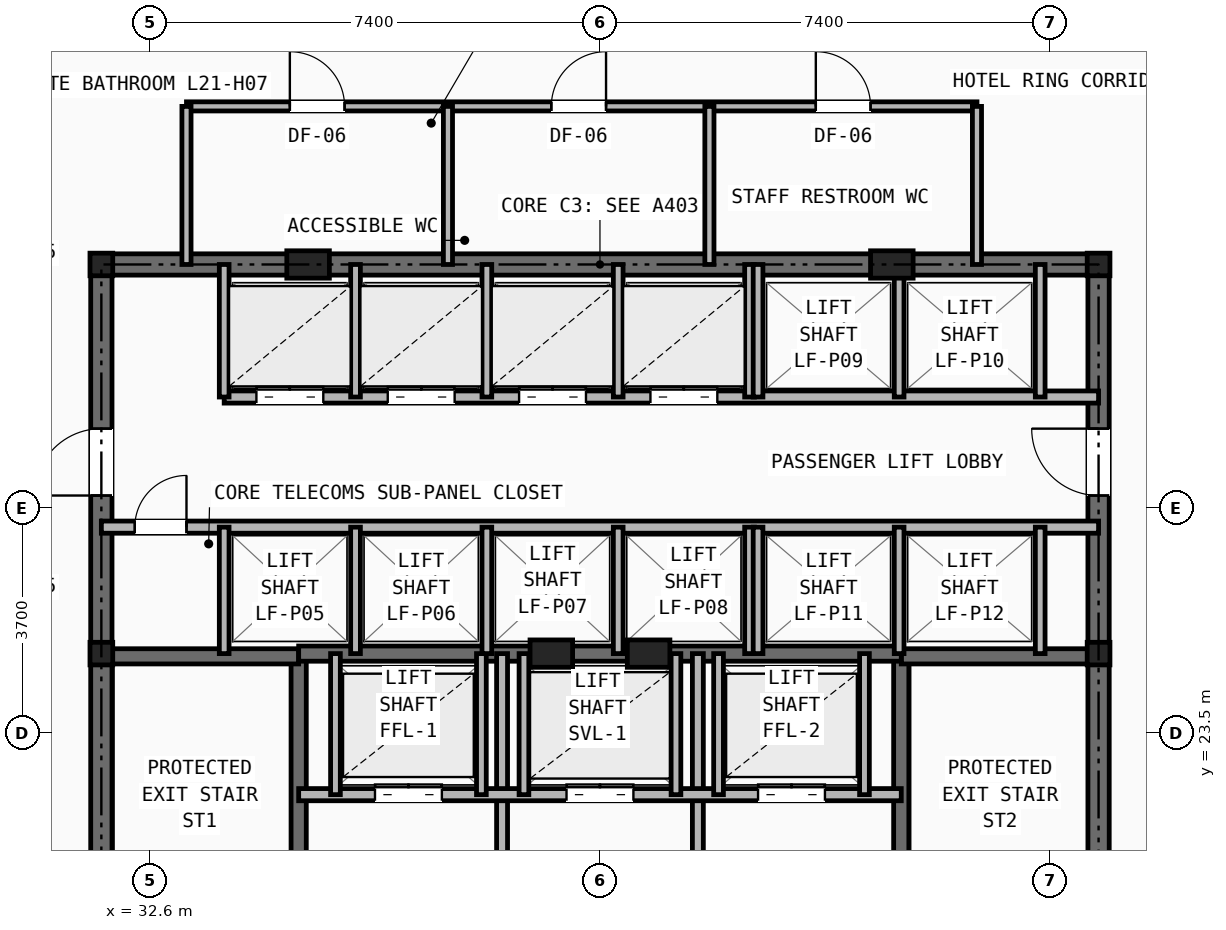
"""IFC4 building model, lengths in metres.
Left out: names, types, materials, properties, quantities, classifications, styles, units other than length and angle.
Written with IfcOpenShell. Run it as: python <this file> out.ifc"""

import sys

from ifc_helpers import new_model, si_unit, direction, frame, frame_2d, origin, origin_2d, place, context, subcontext, project, spatial, rectangle, i_section, extrude, element, fill, save


model = new_model("IFC4")
c1 = context("Model", 3, precision=1e-05, world=origin(), true_north=direction((0.0, 1.0)))
c2 = subcontext(c1, "Body", "Model", "MODEL_VIEW")
j1 = project(units=[si_unit("LENGTHUNIT", "METRE"), si_unit("PLANEANGLEUNIT", "RADIAN")], contexts=[c1])
p1 = place(None, origin())
s1 = spatial("IfcSite", under=j1, at=p1, CompositionType="ELEMENT")
p2 = place(p1, origin())
s2 = spatial("IfcBuilding", under=s1, at=p2, CompositionType="ELEMENT")
p3 = place(p2, frame((0.0, 0.0, 76.6)))
s3 = spatial("IfcBuildingStorey", under=s2, at=p3, CompositionType="ELEMENT", Elevation=76.6)
for number, where, z_axis, x_axis in (
    (1, (31.8, 24.8, 0.0), (0.0, 0.0, 1.0), (1.0, 0.0, 0.0)),
    (2, (48.2, 24.8, 0.0), (0.0, 0.0, 1.0), (1.0, 0.0, 0.0)),
    (3, (31.8, 31.2, 0.0), (0.0, 0.0, 1.0), (1.0, 0.0, 0.0)),
    (4, (48.2, 31.2, 0.0), (0.0, 0.0, 1.0), (1.0, 0.0, 0.0)),
):
    element("IfcColumn", number, at=place(p3, frame(where, z_axis=z_axis, x_axis=x_axis)), inside=s3, PredefinedType="COLUMN", context=c2, shape_type="SweptSolid", body=[
        extrude(i_section(OverallWidth=0.374, OverallDepth=0.372, WebThickness=0.016, FlangeThickness=0.026, at=origin_2d()), origin(), (0.0, 0.0, 1.0), 3.2),
    ])
for number, where, z_axis, x_axis in (
    (5, (35.2, 31.2, 0.0), (0.0, 0.0, 1.0), (1.0, 0.0, 0.0)),
    (6, (44.8, 31.2, 0.0), (0.0, 0.0, 1.0), (1.0, 0.0, 0.0)),
    (7, (39.2, 24.8, 0.0), (0.0, 0.0, 1.0), (1.0, 0.0, 0.0)),
    (8, (40.8, 24.8, 0.0), (0.0, 0.0, 1.0), (1.0, 0.0, 0.0)),
):
    element("IfcColumn", number, at=place(p3, frame(where, z_axis=z_axis, x_axis=x_axis)), inside=s3, PredefinedType="PILASTER", context=c2, shape_type="SweptSolid", body=[
        extrude(rectangle(XDim=0.7, YDim=0.45, at=origin_2d()), origin(), (0.0, 0.0, 1.0), 3.2),
    ])
p4 = place(p3, frame((31.8, 31.2, 0.0), z_axis=(0.0, 0.0, 1.0), x_axis=(1.0, 0.0, 0.0)))
e9 = element("IfcWall", 9, at=p4, inside=s3, PredefinedType="SHEAR", context=c2, shape_type="SweptSolid", body=[
    extrude(rectangle(XDim=16.4, YDim=0.35, at=frame_2d((8.2, 0.0))), origin(), (0.0, 0.0, 1.0), 2.97),
])
p5 = place(p3, frame((31.8, 16.4, 0.0), z_axis=(0.0, 0.0, 1.0), x_axis=(0.0, 1.0, 0.0)))
e10 = element("IfcWall", 10, at=p5, inside=s3, PredefinedType="SHEAR", context=c2, shape_type="SweptSolid", body=[
    extrude(rectangle(XDim=14.8, YDim=0.35, at=frame_2d((7.4, 0.0))), origin(), (0.0, 0.0, 1.0), 2.97),
])
p6 = place(p5, frame((11.0, 0.0, 0.0)))
e11 = element("IfcOpeningElement", 11, at=p6, cuts=e10, PredefinedType="OPENING", context=c2, shape_type="SweptSolid", body=[
    extrude(rectangle(XDim=1.1, YDim=2.15, at=frame_2d((0.55, 1.075))), frame((0.0, 0.185, 0.0), z_axis=(0.0, -1.0, 0.0), x_axis=(1.0, 0.0, 0.0)), (0.0, 0.0, 1.0), 0.37),
])
p7 = place(p3, frame((48.2, 16.4, 0.0), z_axis=(0.0, 0.0, 1.0), x_axis=(0.0, 1.0, 0.0)))
e12 = element("IfcWall", 12, at=p7, inside=s3, PredefinedType="SHEAR", context=c2, shape_type="SweptSolid", body=[
    extrude(rectangle(XDim=14.8, YDim=0.35, at=frame_2d((7.4, 0.0))), origin(), (0.0, 0.0, 1.0), 2.97),
])
p8 = place(p7, frame((11.0, 0.0, 0.0)))
e13 = element("IfcOpeningElement", 13, at=p8, cuts=e12, PredefinedType="OPENING", context=c2, shape_type="SweptSolid", body=[
    extrude(rectangle(XDim=1.1, YDim=2.15, at=frame_2d((0.55, 1.075))), frame((0.0, 0.185, 0.0), z_axis=(0.0, -1.0, 0.0), x_axis=(1.0, 0.0, 0.0)), (0.0, 0.0, 1.0), 0.37),
])
p9 = place(p3, frame((35.045, 16.4, 0.0), z_axis=(0.0, 0.0, 1.0), x_axis=(0.0, 1.0, 0.0)))
e14 = element("IfcWall", 14, at=p9, inside=s3, PredefinedType="SHEAR", context=c2, shape_type="SweptSolid", body=[
    extrude(rectangle(XDim=8.4, YDim=0.25, at=frame_2d((4.2, 0.0))), origin(), (0.0, 0.0, 1.0), 2.97),
])
p10 = place(p9, frame((0.45, 0.0, 0.0)))
e15 = element("IfcOpeningElement", 15, at=p10, cuts=e14, PredefinedType="OPENING", context=c2, shape_type="SweptSolid", body=[
    extrude(rectangle(XDim=0.95, YDim=2.1, at=frame_2d((0.475, 1.05))), frame((0.0, 0.135, 0.0), z_axis=(0.0, -1.0, 0.0), x_axis=(1.0, 0.0, 0.0)), (0.0, 0.0, 1.0), 0.27),
])
p11 = place(p3, frame((31.8, 24.755, 0.0), z_axis=(0.0, 0.0, 1.0), x_axis=(1.0, 0.0, 0.0)))
e16 = element("IfcWall", 16, at=p11, inside=s3, PredefinedType="SHEAR", context=c2, shape_type="SweptSolid", body=[
    extrude(rectangle(XDim=3.245, YDim=0.25, at=frame_2d((1.623, 0.0))), origin(), (0.0, 0.0, 1.0), 2.97),
])
p12 = place(p3, frame((44.955, 16.4, 0.0), z_axis=(0.0, 0.0, 1.0), x_axis=(0.0, 1.0, 0.0)))
e17 = element("IfcWall", 17, at=p12, inside=s3, PredefinedType="SHEAR", context=c2, shape_type="SweptSolid", body=[
    extrude(rectangle(XDim=8.4, YDim=0.25, at=frame_2d((4.2, 0.0))), origin(), (0.0, 0.0, 1.0), 2.97),
])
p13 = place(p12, frame((0.45, 0.0, 0.0)))
e18 = element("IfcOpeningElement", 18, at=p13, cuts=e17, PredefinedType="OPENING", context=c2, shape_type="SweptSolid", body=[
    extrude(rectangle(XDim=0.95, YDim=2.1, at=frame_2d((0.475, 1.05))), frame((0.0, 0.135, 0.0), z_axis=(0.0, -1.0, 0.0), x_axis=(1.0, 0.0, 0.0)), (0.0, 0.0, 1.0), 0.27),
])
p14 = place(p3, frame((44.955, 24.755, 0.0), z_axis=(0.0, 0.0, 1.0), x_axis=(1.0, 0.0, 0.0)))
e19 = element("IfcWall", 19, at=p14, inside=s3, PredefinedType="SHEAR", context=c2, shape_type="SweptSolid", body=[
    extrude(rectangle(XDim=3.245, YDim=0.25, at=frame_2d((1.623, 0.0))), origin(), (0.0, 0.0, 1.0), 2.97),
])
p15 = place(p3, frame((35.045, 24.8, 0.0), z_axis=(0.0, 0.0, 1.0), x_axis=(1.0, 0.0, 0.0)))
e20 = element("IfcWall", 20, at=p15, inside=s3, PredefinedType="SHEAR", context=c2, shape_type="SweptSolid", body=[
    extrude(rectangle(XDim=9.91, YDim=0.25, at=frame_2d((4.955, 0.0))), origin(), (0.0, 0.0, 1.0), 2.97),
])
p16 = place(p3, frame((38.39, 16.4, 0.0), z_axis=(0.0, 0.0, 1.0), x_axis=(0.0, 1.0, 0.0)))
e21 = element("IfcWall", 21, at=p16, inside=s3, PredefinedType="PARTITIONING", context=c2, shape_type="SweptSolid", body=[
    extrude(rectangle(XDim=8.4, YDim=0.18, at=frame_2d((4.2, 0.0))), origin(), (0.0, 0.0, 1.0), 2.421),
])
p17 = place(p16, frame((3.85, 0.0, 0.0)))
e22 = element("IfcOpeningElement", 22, at=p17, cuts=e21, PredefinedType="OPENING", context=c2, shape_type="SweptSolid", body=[
    extrude(rectangle(XDim=0.95, YDim=2.1, at=frame_2d((0.475, 1.05))), frame((0.0, 0.1, 0.0), z_axis=(0.0, -1.0, 0.0), x_axis=(1.0, 0.0, 0.0)), (0.0, 0.0, 1.0), 0.2),
])
p18 = place(p3, frame((41.61, 16.4, 0.0), z_axis=(0.0, 0.0, 1.0), x_axis=(0.0, 1.0, 0.0)))
e23 = element("IfcWall", 23, at=p18, inside=s3, PredefinedType="PARTITIONING", context=c2, shape_type="SweptSolid", body=[
    extrude(rectangle(XDim=8.4, YDim=0.18, at=frame_2d((4.2, 0.0))), origin(), (0.0, 0.0, 1.0), 2.421),
])
p19 = place(p3, frame((35.045, 22.48, 0.0), z_axis=(0.0, 0.0, 1.0), x_axis=(1.0, 0.0, 0.0)))
e24 = element("IfcWall", 24, at=p19, inside=s3, PredefinedType="SOLIDWALL", context=c2, shape_type="SweptSolid", body=[
    extrude(rectangle(XDim=9.91, YDim=0.2, at=frame_2d((4.955, 0.0))), origin(), (0.0, 0.0, 1.0), 2.97),
])
p20 = place(p19, frame((1.255, 0.0, 0.0)))
e25 = element("IfcOpeningElement", 25, at=p20, cuts=e24, PredefinedType="OPENING", context=c2, shape_type="SweptSolid", body=[
    extrude(rectangle(XDim=1.1, YDim=2.15, at=frame_2d((0.55, 1.075))), frame((0.0, 0.11, 0.0), z_axis=(0.0, -1.0, 0.0), x_axis=(1.0, 0.0, 0.0)), (0.0, 0.0, 1.0), 0.22),
])
p21 = place(p19, frame((7.555, 0.0, 0.0)))
e26 = element("IfcOpeningElement", 26, at=p21, cuts=e24, PredefinedType="OPENING", context=c2, shape_type="SweptSolid", body=[
    extrude(rectangle(XDim=1.1, YDim=2.15, at=frame_2d((0.55, 1.075))), frame((0.0, 0.11, 0.0), z_axis=(0.0, -1.0, 0.0), x_axis=(1.0, 0.0, 0.0)), (0.0, 0.0, 1.0), 0.22),
])
p22 = place(p19, frame((4.405, 0.0, 0.0)))
e27 = element("IfcOpeningElement", 27, at=p22, cuts=e24, PredefinedType="OPENING", context=c2, shape_type="SweptSolid", body=[
    extrude(rectangle(XDim=1.1, YDim=2.15, at=frame_2d((0.55, 1.075))), frame((0.0, 0.11, 0.0), z_axis=(0.0, -1.0, 0.0), x_axis=(1.0, 0.0, 0.0)), (0.0, 0.0, 1.0), 0.22),
])
for number, where, z_axis, x_axis in (
    (28, (35.65, 22.48, 0.0), (0.0, 0.0, 1.0), (0.0, 1.0, 0.0)),
    (29, (38.05, 22.48, 0.0), (0.0, 0.0, 1.0), (0.0, 1.0, 0.0)),
    (30, (41.95, 22.48, 0.0), (0.0, 0.0, 1.0), (0.0, 1.0, 0.0)),
    (31, (44.35, 22.48, 0.0), (0.0, 0.0, 1.0), (0.0, 1.0, 0.0)),
    (32, (38.75, 22.48, 0.0), (0.0, 0.0, 1.0), (0.0, 1.0, 0.0)),
    (33, (41.25, 22.48, 0.0), (0.0, 0.0, 1.0), (0.0, 1.0, 0.0)),
):
    element("IfcWall", number, at=place(p3, frame(where, z_axis=z_axis, x_axis=x_axis)), inside=s3, PredefinedType="SOLIDWALL", context=c2, shape_type="SweptSolid", body=[
        extrude(rectangle(XDim=2.32, YDim=0.16, at=frame_2d((1.16, 0.0))), origin(), (0.0, 0.0, 1.0), 2.97),
    ])
p23 = place(p3, frame((33.82, 29.02, 0.0), z_axis=(0.0, 0.0, 1.0), x_axis=(1.0, 0.0, 0.0)))
e34 = element("IfcWall", 34, at=p23, inside=s3, PredefinedType="SOLIDWALL", context=c2, shape_type="SweptSolid", body=[
    extrude(rectangle(XDim=14.38, YDim=0.2, at=frame_2d((7.19, 0.0))), origin(), (0.0, 0.0, 1.0), 2.421),
])
p24 = place(p23, frame((0.53, 0.0, 0.0)))
e35 = element("IfcOpeningElement", 35, at=p24, cuts=e34, PredefinedType="OPENING", context=c2, shape_type="SweptSolid", body=[
    extrude(rectangle(XDim=1.1, YDim=2.15, at=frame_2d((0.55, 1.075))), frame((0.0, 0.11, 0.0), z_axis=(0.0, -1.0, 0.0), x_axis=(1.0, 0.0, 0.0)), (0.0, 0.0, 1.0), 0.22),
])
p25 = place(p23, frame((2.69, 0.0, 0.0)))
e36 = element("IfcOpeningElement", 36, at=p25, cuts=e34, PredefinedType="OPENING", context=c2, shape_type="SweptSolid", body=[
    extrude(rectangle(XDim=1.1, YDim=2.15, at=frame_2d((0.55, 1.075))), frame((0.0, 0.11, 0.0), z_axis=(0.0, -1.0, 0.0), x_axis=(1.0, 0.0, 0.0)), (0.0, 0.0, 1.0), 0.22),
])
p26 = place(p23, frame((4.85, 0.0, 0.0)))
e37 = element("IfcOpeningElement", 37, at=p26, cuts=e34, PredefinedType="OPENING", context=c2, shape_type="SweptSolid", body=[
    extrude(rectangle(XDim=1.1, YDim=2.15, at=frame_2d((0.55, 1.075))), frame((0.0, 0.11, 0.0), z_axis=(0.0, -1.0, 0.0), x_axis=(1.0, 0.0, 0.0)), (0.0, 0.0, 1.0), 0.22),
])
p27 = place(p23, frame((7.01, 0.0, 0.0)))
e38 = element("IfcOpeningElement", 38, at=p27, cuts=e34, PredefinedType="OPENING", context=c2, shape_type="SweptSolid", body=[
    extrude(rectangle(XDim=1.1, YDim=2.15, at=frame_2d((0.55, 1.075))), frame((0.0, 0.11, 0.0), z_axis=(0.0, -1.0, 0.0), x_axis=(1.0, 0.0, 0.0)), (0.0, 0.0, 1.0), 0.22),
])
p28 = place(p3, frame((31.8, 26.88, 0.0), z_axis=(0.0, 0.0, 1.0), x_axis=(1.0, 0.0, 0.0)))
e39 = element("IfcWall", 39, at=p28, inside=s3, PredefinedType="SOLIDWALL", context=c2, shape_type="SweptSolid", body=[
    extrude(rectangle(XDim=16.4, YDim=0.2, at=frame_2d((8.2, 0.0))), origin(), (0.0, 0.0, 1.0), 2.421),
])
p29 = place(p28, frame((0.55, 0.0, 0.0)))
e40 = element("IfcOpeningElement", 40, at=p29, cuts=e39, PredefinedType="OPENING", context=c2, shape_type="SweptSolid", body=[
    extrude(rectangle(XDim=0.85, YDim=2.05, at=frame_2d((0.425, 1.025))), frame((0.0, 0.11, 0.0), z_axis=(0.0, -1.0, 0.0), x_axis=(1.0, 0.0, 0.0)), (0.0, 0.0, 1.0), 0.22),
])
p30 = place(p3, frame((33.82, 29.02, 0.0), z_axis=(0.0, 0.0, 1.0), x_axis=(0.0, 1.0, 0.0)))
e41 = element("IfcWall", 41, at=p30, inside=s3, PredefinedType="SOLIDWALL", context=c2, shape_type="SweptSolid", body=[
    extrude(rectangle(XDim=2.18, YDim=0.16, at=frame_2d((1.09, 0.0))), origin(), (0.0, 0.0, 1.0), 2.421),
])
p31 = place(p3, frame((33.82, 24.8, 0.0), z_axis=(0.0, 0.0, 1.0), x_axis=(0.0, 1.0, 0.0)))
e42 = element("IfcWall", 42, at=p31, inside=s3, PredefinedType="SOLIDWALL", context=c2, shape_type="SweptSolid", body=[
    extrude(rectangle(XDim=2.08, YDim=0.16, at=frame_2d((1.04, 0.0))), origin(), (0.0, 0.0, 1.0), 2.97),
])
for number, where, z_axis, x_axis in (
    (43, (35.98, 29.02, 0.0), (0.0, 0.0, 1.0), (0.0, 1.0, 0.0)),
    (44, (38.14, 29.02, 0.0), (0.0, 0.0, 1.0), (0.0, 1.0, 0.0)),
    (45, (40.3, 29.02, 0.0), (0.0, 0.0, 1.0), (0.0, 1.0, 0.0)),
    (46, (42.46, 29.02, 0.0), (0.0, 0.0, 1.0), (0.0, 1.0, 0.0)),
):
    element("IfcWall", number, at=place(p3, frame(where, z_axis=z_axis, x_axis=x_axis)), inside=s3, PredefinedType="SOLIDWALL", context=c2, shape_type="SweptSolid", body=[
        extrude(rectangle(XDim=2.18, YDim=0.16, at=frame_2d((1.09, 0.0))), origin(), (0.0, 0.0, 1.0), 2.421),
    ])
for number, where, z_axis, x_axis in (
    (47, (35.98, 24.8, 0.0), (0.0, 0.0, 1.0), (0.0, 1.0, 0.0)),
    (48, (38.14, 24.8, 0.0), (0.0, 0.0, 1.0), (0.0, 1.0, 0.0)),
    (49, (40.3, 24.8, 0.0), (0.0, 0.0, 1.0), (0.0, 1.0, 0.0)),
    (50, (42.46, 24.8, 0.0), (0.0, 0.0, 1.0), (0.0, 1.0, 0.0)),
):
    element("IfcWall", number, at=place(p3, frame(where, z_axis=z_axis, x_axis=x_axis)), inside=s3, PredefinedType="SOLIDWALL", context=c2, shape_type="SweptSolid", body=[
        extrude(rectangle(XDim=2.08, YDim=0.16, at=frame_2d((1.04, 0.0))), origin(), (0.0, 0.0, 1.0), 2.97),
    ])
for number, where, z_axis, x_axis in (
    (51, (42.6, 29.02, 0.0), (0.0, 0.0, 1.0), (0.0, 1.0, 0.0)),
    (52, (44.92, 29.02, 0.0), (0.0, 0.0, 1.0), (0.0, 1.0, 0.0)),
    (53, (47.24, 29.02, 0.0), (0.0, 0.0, 1.0), (0.0, 1.0, 0.0)),
):
    element("IfcWall", number, at=place(p3, frame(where, z_axis=z_axis, x_axis=x_axis)), inside=s3, PredefinedType="SOLIDWALL", context=c2, shape_type="SweptSolid", body=[
        extrude(rectangle(XDim=2.18, YDim=0.16, at=frame_2d((1.09, 0.0))), origin(), (0.0, 0.0, 1.0), 2.421),
    ])
for number, where, z_axis, x_axis in (
    (54, (42.6, 24.8, 0.0), (0.0, 0.0, 1.0), (0.0, 1.0, 0.0)),
    (55, (44.92, 24.8, 0.0), (0.0, 0.0, 1.0), (0.0, 1.0, 0.0)),
    (56, (47.24, 24.8, 0.0), (0.0, 0.0, 1.0), (0.0, 1.0, 0.0)),
):
    element("IfcWall", number, at=place(p3, frame(where, z_axis=z_axis, x_axis=x_axis)), inside=s3, PredefinedType="SOLIDWALL", context=c2, shape_type="SweptSolid", body=[
        extrude(rectangle(XDim=2.08, YDim=0.16, at=frame_2d((1.04, 0.0))), origin(), (0.0, 0.0, 1.0), 2.97),
    ])
p32 = place(p3, frame((33.2, 33.8, 0.0), z_axis=(0.0, 0.0, 1.0), x_axis=(1.0, 0.0, 0.0)))
e57 = element("IfcWall", 57, at=p32, inside=s3, PredefinedType="PARTITIONING", context=c2, shape_type="SweptSolid", body=[
    extrude(rectangle(XDim=13.0, YDim=0.15, at=frame_2d((6.5, 0.0))), origin(), (0.0, 0.0, 1.0), 2.97),
])
p33 = place(p32, frame((1.7, 0.0, 0.0)))
e58 = element("IfcOpeningElement", 58, at=p33, cuts=e57, PredefinedType="OPENING", context=c2, shape_type="SweptSolid", body=[
    extrude(rectangle(XDim=0.9, YDim=2.1, at=frame_2d((0.45, 1.05))), frame((0.0, 0.085, 0.0), z_axis=(0.0, -1.0, 0.0), x_axis=(1.0, 0.0, 0.0)), (0.0, 0.0, 1.0), 0.17),
])
p34 = place(p32, frame((6.0, 0.0, 0.0)))
e59 = element("IfcOpeningElement", 59, at=p34, cuts=e57, PredefinedType="OPENING", context=c2, shape_type="SweptSolid", body=[
    extrude(rectangle(XDim=0.9, YDim=2.1, at=frame_2d((0.45, 1.05))), frame((0.0, 0.085, 0.0), z_axis=(0.0, -1.0, 0.0), x_axis=(1.0, 0.0, 0.0)), (0.0, 0.0, 1.0), 0.17),
])
p35 = place(p32, frame((10.35, 0.0, 0.0)))
e60 = element("IfcOpeningElement", 60, at=p35, cuts=e57, PredefinedType="OPENING", context=c2, shape_type="SweptSolid", body=[
    extrude(rectangle(XDim=0.9, YDim=2.1, at=frame_2d((0.45, 1.05))), frame((0.0, 0.085, 0.0), z_axis=(0.0, -1.0, 0.0), x_axis=(1.0, 0.0, 0.0)), (0.0, 0.0, 1.0), 0.17),
])
for number, where, z_axis, x_axis in (
    (61, (33.2, 31.2, 0.0), (0.0, 0.0, 1.0), (0.0, 1.0, 0.0)),
    (62, (46.2, 31.2, 0.0), (0.0, 0.0, 1.0), (0.0, 1.0, 0.0)),
    (63, (37.5, 31.2, 0.0), (0.0, 0.0, 1.0), (0.0, 1.0, 0.0)),
    (64, (41.8, 31.2, 0.0), (0.0, 0.0, 1.0), (0.0, 1.0, 0.0)),
):
    element("IfcWall", number, at=place(p3, frame(where, z_axis=z_axis, x_axis=x_axis)), inside=s3, PredefinedType="PARTITIONING", context=c2, shape_type="SweptSolid", body=[
        extrude(rectangle(XDim=2.6, YDim=0.15, at=frame_2d((1.3, 0.0))), origin(), (0.0, 0.0, 1.0), 2.421),
    ])
p36 = place(p20, origin())
e65 = element("IfcDoor", 65, at=p36, inside=s3, OperationType="DOUBLE_DOOR_SLIDING", PredefinedType="DOOR", context=c2, shape_type="SweptSolid", body=[
    extrude(rectangle(XDim=1.1, YDim=2.15, at=frame_2d((0.55, 1.075))), frame((0.0, 0.025, 0.0), z_axis=(0.0, -1.0, 0.0), x_axis=(1.0, 0.0, 0.0)), (0.0, 0.0, 1.0), 0.05),
])
fill(e25, e65)
p37 = place(p21, origin())
e66 = element("IfcDoor", 66, at=p37, inside=s3, OperationType="DOUBLE_DOOR_SLIDING", PredefinedType="DOOR", context=c2, shape_type="SweptSolid", body=[
    extrude(rectangle(XDim=1.1, YDim=2.15, at=frame_2d((0.55, 1.075))), frame((0.0, 0.025, 0.0), z_axis=(0.0, -1.0, 0.0), x_axis=(1.0, 0.0, 0.0)), (0.0, 0.0, 1.0), 0.05),
])
fill(e26, e66)
p38 = place(p22, origin())
e67 = element("IfcDoor", 67, at=p38, inside=s3, OperationType="DOUBLE_DOOR_SLIDING", PredefinedType="DOOR", context=c2, shape_type="SweptSolid", body=[
    extrude(rectangle(XDim=1.1, YDim=2.15, at=frame_2d((0.55, 1.075))), frame((0.0, 0.025, 0.0), z_axis=(0.0, -1.0, 0.0), x_axis=(1.0, 0.0, 0.0)), (0.0, 0.0, 1.0), 0.05),
])
fill(e27, e67)
p39 = place(p29, origin())
e68 = element("IfcDoor", 68, at=p39, inside=s3, OperationType="SINGLE_SWING_RIGHT", PredefinedType="DOOR", context=c2, shape_type="SweptSolid", body=[
    extrude(rectangle(XDim=0.85, YDim=2.05, at=frame_2d((0.425, 1.025))), frame((0.0, 0.025, 0.0), z_axis=(0.0, -1.0, 0.0), x_axis=(1.0, 0.0, 0.0)), (0.0, 0.0, 1.0), 0.05),
])
fill(e40, e68)
p40 = place(p6, origin())
e69 = element("IfcDoor", 69, at=p40, inside=s3, OperationType="SINGLE_SWING_LEFT", PredefinedType="DOOR", context=c2, shape_type="SweptSolid", body=[
    extrude(rectangle(XDim=1.1, YDim=2.15, at=frame_2d((0.55, 1.075))), frame((0.0, 0.025, 0.0), z_axis=(0.0, -1.0, 0.0), x_axis=(1.0, 0.0, 0.0)), (0.0, 0.0, 1.0), 0.05),
])
fill(e11, e69)
p41 = place(p8, origin())
e70 = element("IfcDoor", 70, at=p41, inside=s3, OperationType="SINGLE_SWING_RIGHT", PredefinedType="DOOR", context=c2, shape_type="SweptSolid", body=[
    extrude(rectangle(XDim=1.1, YDim=2.15, at=frame_2d((0.55, 1.075))), frame((0.0, 0.025, 0.0), z_axis=(0.0, -1.0, 0.0), x_axis=(1.0, 0.0, 0.0)), (0.0, 0.0, 1.0), 0.05),
])
fill(e13, e70)
p42 = place(p24, origin())
e71 = element("IfcDoor", 71, at=p42, inside=s3, OperationType="DOUBLE_DOOR_SLIDING", PredefinedType="DOOR", context=c2, shape_type="SweptSolid", body=[
    extrude(rectangle(XDim=1.1, YDim=2.15, at=frame_2d((0.55, 1.075))), frame((0.0, 0.025, 0.0), z_axis=(0.0, -1.0, 0.0), x_axis=(1.0, 0.0, 0.0)), (0.0, 0.0, 1.0), 0.05),
])
fill(e35, e71)
p43 = place(p25, origin())
e72 = element("IfcDoor", 72, at=p43, inside=s3, OperationType="DOUBLE_DOOR_SLIDING", PredefinedType="DOOR", context=c2, shape_type="SweptSolid", body=[
    extrude(rectangle(XDim=1.1, YDim=2.15, at=frame_2d((0.55, 1.075))), frame((0.0, 0.025, 0.0), z_axis=(0.0, -1.0, 0.0), x_axis=(1.0, 0.0, 0.0)), (0.0, 0.0, 1.0), 0.05),
])
fill(e36, e72)
p44 = place(p26, origin())
e73 = element("IfcDoor", 73, at=p44, inside=s3, OperationType="DOUBLE_DOOR_SLIDING", PredefinedType="DOOR", context=c2, shape_type="SweptSolid", body=[
    extrude(rectangle(XDim=1.1, YDim=2.15, at=frame_2d((0.55, 1.075))), frame((0.0, 0.025, 0.0), z_axis=(0.0, -1.0, 0.0), x_axis=(1.0, 0.0, 0.0)), (0.0, 0.0, 1.0), 0.05),
])
fill(e37, e73)
p45 = place(p27, origin())
e74 = element("IfcDoor", 74, at=p45, inside=s3, OperationType="DOUBLE_DOOR_SLIDING", PredefinedType="DOOR", context=c2, shape_type="SweptSolid", body=[
    extrude(rectangle(XDim=1.1, YDim=2.15, at=frame_2d((0.55, 1.075))), frame((0.0, 0.025, 0.0), z_axis=(0.0, -1.0, 0.0), x_axis=(1.0, 0.0, 0.0)), (0.0, 0.0, 1.0), 0.05),
])
fill(e38, e74)
p46 = place(p33, origin())
e75 = element("IfcDoor", 75, at=p46, inside=s3, OperationType="SINGLE_SWING_LEFT", PredefinedType="DOOR", context=c2, shape_type="SweptSolid", body=[
    extrude(rectangle(XDim=0.9, YDim=2.1, at=frame_2d((0.45, 1.05))), frame((0.0, 0.025, 0.0), z_axis=(0.0, -1.0, 0.0), x_axis=(1.0, 0.0, 0.0)), (0.0, 0.0, 1.0), 0.05),
])
fill(e58, e75)
p47 = place(p34, origin())
e76 = element("IfcDoor", 76, at=p47, inside=s3, OperationType="SINGLE_SWING_RIGHT", PredefinedType="DOOR", context=c2, shape_type="SweptSolid", body=[
    extrude(rectangle(XDim=0.9, YDim=2.1, at=frame_2d((0.45, 1.05))), frame((0.0, 0.025, 0.0), z_axis=(0.0, -1.0, 0.0), x_axis=(1.0, 0.0, 0.0)), (0.0, 0.0, 1.0), 0.05),
])
fill(e59, e76)
p48 = place(p35, origin())
e77 = element("IfcDoor", 77, at=p48, inside=s3, OperationType="SINGLE_SWING_LEFT", PredefinedType="DOOR", context=c2, shape_type="SweptSolid", body=[
    extrude(rectangle(XDim=0.9, YDim=2.1, at=frame_2d((0.45, 1.05))), frame((0.0, 0.025, 0.0), z_axis=(0.0, -1.0, 0.0), x_axis=(1.0, 0.0, 0.0)), (0.0, 0.0, 1.0), 0.05),
])
fill(e60, e77)
save(model, sys.argv[1])
